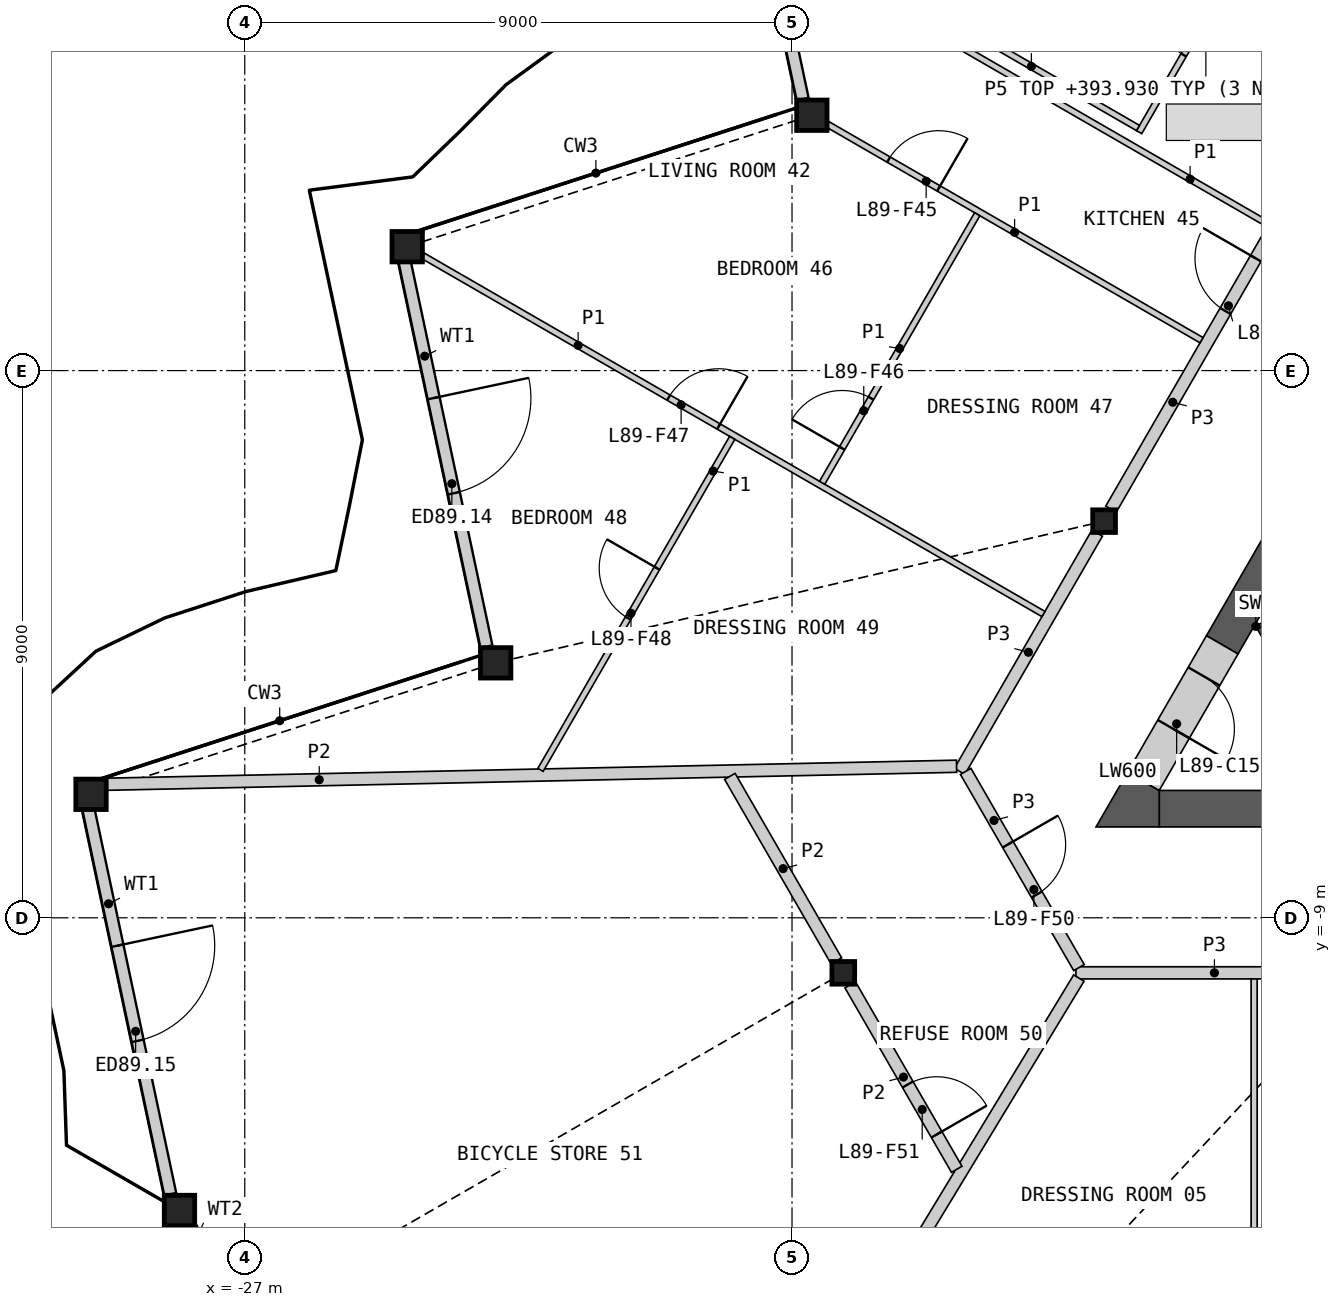
"""IFC4 building model, lengths in metres.
Left out: names, types, materials, properties, quantities, classifications, styles, units other than length and angle.
Written with IfcOpenShell. Run it as: python <this file> out.ifc"""

import sys

from ifc_helpers import new_model, si_unit, direction, frame, frame_2d, origin, origin_2d, place, context, subcontext, project, spatial, polyline, rectangle, hollow_rectangle, i_section, outline, extrude, element, fill, save


model = new_model("IFC4")
c1 = context("Model", 3, precision=1e-05, world=origin(), true_north=direction((0.0, 1.0)))
c2 = subcontext(c1, "Body", "Model", "MODEL_VIEW")
j1 = project(units=[si_unit("LENGTHUNIT", "METRE"), si_unit("PLANEANGLEUNIT", "RADIAN")], contexts=[c1])
p1 = place(None, origin())
s1 = spatial("IfcSite", under=j1, at=p1, CompositionType="ELEMENT")
p2 = place(p1, origin())
s2 = spatial("IfcBuilding", under=s1, at=p2, CompositionType="ELEMENT")
p3 = place(p2, frame((0.0, 0.0, 391.6)))
s3 = spatial("IfcBuildingStorey", under=s2, at=p3, CompositionType="ELEMENT", Elevation=391.6)
for number, where, z_axis, x_axis in (
    (1, (-17.674, 4.199, 0.0), (0.0, 0.0, 1.0), (1.0, 0.0, 0.0)),
    (2, (-24.329, 2.037, 0.0), (0.0, 0.0, 1.0), (1.0, 0.0, 0.0)),
    (3, (-22.874, -4.807, 0.0), (0.0, 0.0, 1.0), (1.0, 0.0, 0.0)),
    (4, (-29.529, -6.969, 0.0), (0.0, 0.0, 1.0), (1.0, 0.0, 0.0)),
    (5, (-28.074, -13.814, 0.0), (0.0, 0.0, 1.0), (1.0, 0.0, 0.0)),
):
    element("IfcColumn", number, at=place(p3, frame(where, z_axis=z_axis, x_axis=x_axis)), inside=s3, PredefinedType="COLUMN", context=c2, shape_type="SweptSolid", body=[
        extrude(hollow_rectangle(XDim=0.5, YDim=0.5, WallThickness=0.03, at=origin_2d()), origin(), (0.0, 0.0, 1.0), 3.4),
    ])
for number, where, z_axis, x_axis in (
    (6, (-12.868, -2.476, 0.0), (0.0, 0.0, 1.0), (1.0, 0.0, 0.0)),
    (7, (-17.157, -9.906, 0.0), (0.0, 0.0, 1.0), (1.0, 0.0, 0.0)),
):
    element("IfcColumn", number, at=place(p3, frame(where, z_axis=z_axis, x_axis=x_axis)), inside=s3, PredefinedType="COLUMN", context=c2, shape_type="SweptSolid", body=[
        extrude(i_section(OverallWidth=0.374, OverallDepth=0.372, WebThickness=0.016, FlangeThickness=0.026, at=origin_2d()), origin(), (0.0, 0.0, 1.0), 3.4),
    ])
p4 = place(p3, frame((-19.179, 10.836, 0.0), z_axis=(0.0, 0.0, 1.0), x_axis=(0.207910765171, -0.978147797486, 0.0)))
e8 = element("IfcWall", 8, at=p4, inside=s3, PredefinedType="SOLIDWALL", context=c2, shape_type="SweptSolid", body=[
    extrude(rectangle(XDim=6.512, YDim=0.2, at=frame_2d((3.256, 0.0))), origin(), (0.0, 0.0, 1.0), 2.634),
])
p5 = place(p4, frame((2.333, 0.0, 0.0)))
e9 = element("IfcOpeningElement", 9, at=p5, cuts=e8, PredefinedType="OPENING", context=c2, shape_type="SweptSolid", body=[
    extrude(rectangle(XDim=1.6, YDim=2.25, at=frame_2d((0.8, 1.125))), frame((0.0, 0.11, 0.0), z_axis=(0.0, -1.0, 0.0), x_axis=(1.0, 0.0, 0.0)), (0.0, 0.0, 1.0), 0.22),
])
p6 = place(p3, frame((-24.379, 1.83, 0.0), z_axis=(0.0, 0.0, 1.0), x_axis=(0.207910765171, -0.978147797486, 0.0)))
e10 = element("IfcWall", 10, at=p6, inside=s3, PredefinedType="SOLIDWALL", context=c2, shape_type="SweptSolid", body=[
    extrude(rectangle(XDim=6.512, YDim=0.2, at=frame_2d((3.256, 0.0))), origin(), (0.0, 0.0, 1.0), 2.634),
])
p7 = place(p6, frame((2.333, 0.0, 0.0)))
e11 = element("IfcOpeningElement", 11, at=p7, cuts=e10, PredefinedType="OPENING", context=c2, shape_type="SweptSolid", body=[
    extrude(rectangle(XDim=1.6, YDim=2.25, at=frame_2d((0.8, 1.125))), frame((0.0, 0.11, 0.0), z_axis=(0.0, -1.0, 0.0), x_axis=(1.0, 0.0, 0.0)), (0.0, 0.0, 1.0), 0.22),
])
p8 = place(p3, frame((-29.579, -7.177, 0.0), z_axis=(0.0, 0.0, 1.0), x_axis=(0.207910765171, -0.978147797486, 0.0)))
e12 = element("IfcWall", 12, at=p8, inside=s3, PredefinedType="SOLIDWALL", context=c2, shape_type="SweptSolid", body=[
    extrude(rectangle(XDim=6.512, YDim=0.2, at=frame_2d((3.256, 0.0))), origin(), (0.0, 0.0, 1.0), 2.634),
])
p9 = place(p8, frame((2.333, 0.0, 0.0)))
e13 = element("IfcOpeningElement", 13, at=p9, cuts=e12, PredefinedType="OPENING", context=c2, shape_type="SweptSolid", body=[
    extrude(rectangle(XDim=1.6, YDim=2.25, at=frame_2d((0.8, 1.125))), frame((0.0, 0.11, 0.0), z_axis=(0.0, -1.0, 0.0), x_axis=(1.0, 0.0, 0.0)), (0.0, 0.0, 1.0), 0.22),
])
p10 = place(p3, frame((-28.007, -13.939, 0.0), z_axis=(0.0, 0.0, 1.0), x_axis=(0.499967189098, -0.866044346339, 0.0)))
e14 = element("IfcWall", 14, at=p10, inside=s3, PredefinedType="SOLIDWALL", context=c2, shape_type="SweptSolid", body=[
    extrude(rectangle(XDim=1.612, YDim=0.25, at=frame_2d((0.806, 0.0))), origin(), (0.0, 0.0, 1.0), 2.634),
])
p11 = place(p10, frame((0.25, 0.0, 0.4)))
e15 = element("IfcOpeningElement", 15, at=p11, cuts=e14, PredefinedType="OPENING", context=c2, shape_type="SweptSolid", body=[
    extrude(rectangle(XDim=0.6, YDim=0.6, at=frame_2d((0.3, 0.3))), frame((0.0, 0.135, 0.0), z_axis=(0.0, -1.0, 0.0), x_axis=(1.0, 0.0, 0.0)), (0.0, 0.0, 1.0), 0.27),
])
p12 = place(p3, origin())
e16 = element("IfcWall", 16, at=p12, inside=s3, PredefinedType="SHEAR", context=c2, shape_type="SweptSolid", body=[
    extrude(outline(polyline([(-5.307, -1.281), (-10.374, -4.206), (-10.032, -4.298), (-5.182, -1.498), (-5.307, -1.281)])), origin(), (0.0, 0.0, 1.0), 3.1),
])
p13 = place(p3, origin())
e17 = element("IfcWall", 17, at=p13, inside=s3, PredefinedType="SHEAR", context=c2, shape_type="SweptSolid", body=[
    extrude(outline(polyline([(-10.374, -4.206), (-8.83, -6.881), (-8.738, -6.539), (-10.032, -4.298), (-10.374, -4.206)])), origin(), (0.0, 0.0, 1.0), 3.1),
])
p14 = place(p3, frame((-11.961, -7.206, 0.0), z_axis=(0.0, 0.0, 1.0), x_axis=(1.0, 0.0, 0.0)))
e18 = element("IfcWall", 18, at=p14, inside=s3, PredefinedType="SHEAR", context=c2, shape_type="SweptSolid", body=[
    extrude(rectangle(XDim=23.921, YDim=0.6, at=frame_2d((11.961, 0.0))), origin(), (0.0, 0.0, 1.0), 3.1),
])
p15 = place(p3, frame((-8.44, -0.208, 0.0), z_axis=(0.0, 0.0, 1.0), x_axis=(-0.500007425856, -0.866021116422, 0.0)))
e19 = element("IfcWall", 19, at=p15, inside=s3, PredefinedType="SHEAR", context=c2, shape_type="SweptSolid", body=[
    extrude(rectangle(XDim=4.969, YDim=0.6, at=frame_2d((2.484, 0.0))), origin(), (0.0, 0.0, 1.0), 3.1),
])
p16 = place(p3, origin())
e20 = element("IfcWall", 20, at=p16, inside=s3, PredefinedType="SHEAR", context=c2, shape_type="SweptSolid", body=[
    extrude(outline(polyline([(-12.48, -6.606), (-11.961, -6.906), (-11.961, -7.506), (-13.0, -7.506), (-12.48, -6.606)])), origin(), (0.0, 0.0, 1.0), 3.1),
])
p17 = place(p3, frame((-10.925, -4.511, 0.0), z_axis=(0.0, 0.0, 1.0), x_axis=(-0.500018667571, -0.866014625789, 0.0)))
e21 = element("IfcWall", 21, at=p17, inside=s3, PredefinedType="SHEAR", context=c2, shape_type="SweptSolid", body=[
    extrude(rectangle(XDim=2.592, YDim=0.6, at=frame_2d((1.296, 0.0))), origin(), (0.0, 0.0, 1.0), 3.1),
])
p18 = place(p17, frame((0.6, 0.0, 0.0)))
e22 = element("IfcOpeningElement", 22, at=p18, cuts=e21, PredefinedType="OPENING", context=c2, shape_type="SweptSolid", body=[
    extrude(rectangle(XDim=1.0, YDim=2.1, at=frame_2d((0.5, 1.05))), frame((0.0, 0.31, 0.0), z_axis=(0.0, -1.0, 0.0), x_axis=(1.0, 0.0, 0.0)), (0.0, 0.0, 1.0), 0.62),
])
p19 = place(p3, frame((-12.754, -2.279, 0.0), z_axis=(0.0, 0.0, 1.0), x_axis=(0.500001682468, 0.866024432409, 0.0)))
e23 = element("IfcWall", 23, at=p19, inside=s3, PredefinedType="PARTITIONING", context=c2, shape_type="SweptSolid", body=[
    extrude(rectangle(XDim=8.124, YDim=0.2, at=frame_2d((4.062, 0.0))), origin(), (0.0, 0.0, 1.0), 3.1),
])
p20 = place(p19, frame((3.762, 0.0, 0.0)))
e24 = element("IfcOpeningElement", 24, at=p20, cuts=e23, PredefinedType="OPENING", context=c2, shape_type="SweptSolid", body=[
    extrude(rectangle(XDim=1.0, YDim=2.1, at=frame_2d((0.5, 1.05))), frame((0.0, 0.11, 0.0), z_axis=(0.0, -1.0, 0.0), x_axis=(1.0, 0.0, 0.0)), (0.0, 0.0, 1.0), 0.22),
])
p21 = place(p3, frame((-13.331, -9.906, 0.0), z_axis=(0.0, 0.0, 1.0), x_axis=(1.0, 0.0, 0.0)))
e25 = element("IfcWall", 25, at=p21, inside=s3, PredefinedType="PARTITIONING", context=c2, shape_type="SweptSolid", body=[
    extrude(rectangle(XDim=4.555, YDim=0.2, at=frame_2d((2.278, 0.0))), origin(), (0.0, 0.0, 1.0), 3.1),
])
p22 = place(p3, frame((-15.244, -6.592, 0.0), z_axis=(0.0, 0.0, 1.0), x_axis=(0.499974648164, 0.866040040179, 0.0)))
e26 = element("IfcWall", 26, at=p22, inside=s3, PredefinedType="PARTITIONING", context=c2, shape_type="SweptSolid", body=[
    extrude(rectangle(XDim=4.525, YDim=0.2, at=frame_2d((2.263, 0.0))), origin(), (0.0, 0.0, 1.0), 3.1),
])
p23 = place(p3, frame((-15.144, -6.592, 0.0), z_axis=(0.0, 0.0, 1.0), x_axis=(0.499958791762, -0.866049194065, 0.0)))
e27 = element("IfcWall", 27, at=p23, inside=s3, PredefinedType="PARTITIONING", context=c2, shape_type="SweptSolid", body=[
    extrude(rectangle(XDim=3.726, YDim=0.2, at=frame_2d((1.863, 0.0))), origin(), (0.0, 0.0, 1.0), 3.1),
])
p24 = place(p23, frame((1.388, 0.0, 0.0)))
e28 = element("IfcOpeningElement", 28, at=p24, cuts=e27, PredefinedType="OPENING", context=c2, shape_type="SweptSolid", body=[
    extrude(rectangle(XDim=0.95, YDim=2.1, at=frame_2d((0.475, 1.05))), frame((0.0, 0.11, 0.0), z_axis=(0.0, -1.0, 0.0), x_axis=(1.0, 0.0, 0.0)), (0.0, 0.0, 1.0), 0.22),
])
p25 = place(p3, frame((-10.873, 6.278, 0.0), z_axis=(0.0, 0.0, 1.0), x_axis=(0.865989219354, -0.500062668036, 0.0)))
e29 = element("IfcWall", 29, at=p25, inside=s3, PredefinedType="PARTITIONING", context=c2, shape_type="SweptSolid", body=[
    extrude(rectangle(XDim=2.423, YDim=0.25, at=frame_2d((1.211, 0.0))), origin(), (0.0, 0.0, 1.0), 2.33),
])
p26 = place(p3, frame((-20.354, -21.66, 0.0), z_axis=(0.0, 0.0, 1.0), x_axis=(0.518240642668, 0.85523484277, 0.0)))
e30 = element("IfcWall", 30, at=p26, inside=s3, PredefinedType="PARTITIONING", context=c2, shape_type="SweptSolid", body=[
    extrude(rectangle(XDim=13.644, YDim=0.2, at=frame_2d((6.822, 0.0))), origin(), (0.0, 0.0, 1.0), 2.33),
])
p27 = place(p3, frame((-29.269, -6.804, 0.0), z_axis=(0.0, 0.0, 1.0), x_axis=(0.999775536303, 0.021186717777, 0.0)))
e31 = element("IfcWall", 31, at=p27, inside=s3, PredefinedType="PARTITIONING", context=c2, shape_type="SweptSolid", body=[
    extrude(rectangle(XDim=13.978, YDim=0.2, at=frame_2d((6.989, 0.0))), origin(), (0.0, 0.0, 1.0), 2.33),
])
p28 = place(p3, frame((-17.043, -10.103, 0.0), z_axis=(0.0, 0.0, 1.0), x_axis=(0.500005931509, -0.866021979199, 0.0)))
e32 = element("IfcWall", 32, at=p28, inside=s3, PredefinedType="PARTITIONING", context=c2, shape_type="SweptSolid", body=[
    extrude(rectangle(XDim=3.504, YDim=0.2, at=frame_2d((1.752, 0.0))), origin(), (0.0, 0.0, 1.0), 2.33),
])
p29 = place(p28, frame((1.893, 0.0, 0.0)))
e33 = element("IfcOpeningElement", 33, at=p29, cuts=e32, PredefinedType="OPENING", context=c2, shape_type="SweptSolid", body=[
    extrude(rectangle(XDim=0.95, YDim=2.1, at=frame_2d((0.475, 1.05))), frame((0.0, 0.11, 0.0), z_axis=(0.0, -1.0, 0.0), x_axis=(1.0, 0.0, 0.0)), (0.0, 0.0, 1.0), 0.22),
])
p30 = place(p3, frame((-19.022, -6.674, 0.0), z_axis=(0.0, 0.0, 1.0), x_axis=(0.499983843005, -0.866034731829, 0.0)))
e34 = element("IfcWall", 34, at=p30, inside=s3, PredefinedType="PARTITIONING", context=c2, shape_type="SweptSolid", body=[
    extrude(rectangle(XDim=3.503, YDim=0.2, at=frame_2d((1.752, 0.0))), origin(), (0.0, 0.0, 1.0), 2.33),
])
p31 = place(p3, frame((-10.4, -21.828, 0.0), z_axis=(0.0, 0.0, 1.0), x_axis=(0.0, 1.0, 0.0)))
e35 = element("IfcWall", 35, at=p31, inside=s3, PredefinedType="PARTITIONING", context=c2, shape_type="SweptSolid", body=[
    extrude(rectangle(XDim=11.822, YDim=0.1, at=frame_2d((5.911, 0.0))), origin(), (0.0, 0.0, 1.0), 2.33),
])
p32 = place(p31, frame((1.358, 0.0, 0.0)))
e36 = element("IfcOpeningElement", 36, at=p32, cuts=e35, PredefinedType="OPENING", context=c2, shape_type="SweptSolid", body=[
    extrude(rectangle(XDim=0.95, YDim=2.1, at=frame_2d((0.475, 1.05))), frame((0.0, 0.06, 0.0), z_axis=(0.0, -1.0, 0.0), x_axis=(1.0, 0.0, 0.0)), (0.0, 0.0, 1.0), 0.12),
])
p33 = place(p3, frame((-24.069, 1.887, 0.0), z_axis=(0.0, 0.0, 1.0), x_axis=(0.866023404247, -0.500003463284, 0.0)))
e37 = element("IfcWall", 37, at=p33, inside=s3, PredefinedType="PARTITIONING", context=c2, shape_type="SweptSolid", body=[
    extrude(rectangle(XDim=11.782, YDim=0.1, at=frame_2d((5.891, 0.0))), origin(), (0.0, 0.0, 1.0), 2.33),
])
p34 = place(p33, frame((4.664, 0.0, 0.0)))
e38 = element("IfcOpeningElement", 38, at=p34, cuts=e37, PredefinedType="OPENING", context=c2, shape_type="SweptSolid", body=[
    extrude(rectangle(XDim=0.95, YDim=2.1, at=frame_2d((0.475, 1.05))), frame((0.0, 0.06, 0.0), z_axis=(0.0, -1.0, 0.0), x_axis=(1.0, 0.0, 0.0)), (0.0, 0.0, 1.0), 0.12),
])
p35 = place(p3, frame((-17.414, 4.049, 0.0), z_axis=(0.0, 0.0, 1.0), x_axis=(0.866033839264, -0.499985389037, 0.0)))
e39 = element("IfcWall", 39, at=p35, inside=s3, PredefinedType="PARTITIONING", context=c2, shape_type="SweptSolid", body=[
    extrude(rectangle(XDim=7.1, YDim=0.1, at=frame_2d((3.55, 0.0))), origin(), (0.0, 0.0, 1.0), 2.33),
])
p36 = place(p35, frame((1.158, 0.0, 0.0)))
e40 = element("IfcOpeningElement", 40, at=p36, cuts=e39, PredefinedType="OPENING", context=c2, shape_type="SweptSolid", body=[
    extrude(rectangle(XDim=0.95, YDim=2.1, at=frame_2d((0.475, 1.05))), frame((0.0, 0.06, 0.0), z_axis=(0.0, -1.0, 0.0), x_axis=(1.0, 0.0, 0.0)), (0.0, 0.0, 1.0), 0.12),
])
p37 = place(p3, frame((-22.136, -6.567, 0.0), z_axis=(0.0, 0.0, 1.0), x_axis=(0.500016298831, 0.866015993445, 0.0)))
e41 = element("IfcWall", 41, at=p37, inside=s3, PredefinedType="PARTITIONING", context=c2, shape_type="SweptSolid", body=[
    extrude(rectangle(XDim=6.305, YDim=0.1, at=frame_2d((3.152, 0.0))), origin(), (0.0, 0.0, 1.0), 2.33),
])
p38 = place(p37, frame((2.88, 0.0, 0.0)))
e42 = element("IfcOpeningElement", 42, at=p38, cuts=e41, PredefinedType="OPENING", context=c2, shape_type="SweptSolid", body=[
    extrude(rectangle(XDim=0.95, YDim=2.1, at=frame_2d((0.475, 1.05))), frame((0.0, 0.06, 0.0), z_axis=(0.0, -1.0, 0.0), x_axis=(1.0, 0.0, 0.0)), (0.0, 0.0, 1.0), 0.12),
])
p39 = place(p3, frame((-15.318, 5.38, 0.0), z_axis=(0.0, 0.0, 1.0), x_axis=(0.866035260786, -0.499982926783, 0.0)))
e43 = element("IfcWall", 43, at=p39, inside=s3, PredefinedType="PARTITIONING", context=c2, shape_type="SweptSolid", body=[
    extrude(rectangle(XDim=5.95, YDim=0.1, at=frame_2d((2.975, 0.0))), origin(), (0.0, 0.0, 1.0), 2.33),
])
p40 = place(p3, frame((-12.292, 3.921, 0.0), z_axis=(0.0, 0.0, 1.0), x_axis=(0.499996545922, 0.866027397988, 0.0)))
e44 = element("IfcWall", 44, at=p40, inside=s3, PredefinedType="PARTITIONING", context=c2, shape_type="SweptSolid", body=[
    extrude(rectangle(XDim=5.5, YDim=0.1, at=frame_2d((2.75, 0.0))), origin(), (0.0, 0.0, 1.0), 2.33),
])
p41 = place(p40, frame((4.3, 0.0, 0.0)))
e45 = element("IfcOpeningElement", 45, at=p41, cuts=e44, PredefinedType="OPENING", context=c2, shape_type="SweptSolid", body=[
    extrude(rectangle(XDim=0.95, YDim=2.1, at=frame_2d((0.475, 1.05))), frame((0.0, 0.06, 0.0), z_axis=(0.0, -1.0, 0.0), x_axis=(1.0, 0.0, 0.0)), (0.0, 0.0, 1.0), 0.12),
])
p42 = place(p40, frame((1.465, 0.0, 0.0)))
e46 = element("IfcOpeningElement", 46, at=p42, cuts=e44, PredefinedType="OPENING", context=c2, shape_type="SweptSolid", body=[
    extrude(rectangle(XDim=0.95, YDim=2.1, at=frame_2d((0.475, 1.05))), frame((0.0, 0.06, 0.0), z_axis=(0.0, -1.0, 0.0), x_axis=(1.0, 0.0, 0.0)), (0.0, 0.0, 1.0), 0.12),
])
p43 = place(p3, frame((-17.504, -1.845, 0.0), z_axis=(0.0, 0.0, 1.0), x_axis=(0.499984882974, 0.866034131428, 0.0)))
e47 = element("IfcWall", 47, at=p43, inside=s3, PredefinedType="PARTITIONING", context=c2, shape_type="SweptSolid", body=[
    extrude(rectangle(XDim=5.1, YDim=0.1, at=frame_2d((2.55, 0.0))), origin(), (0.0, 0.0, 1.0), 2.33),
])
p44 = place(p43, frame((0.656, 0.0, 0.0)))
e48 = element("IfcOpeningElement", 48, at=p44, cuts=e47, PredefinedType="OPENING", context=c2, shape_type="SweptSolid", body=[
    extrude(rectangle(XDim=0.95, YDim=2.1, at=frame_2d((0.475, 1.05))), frame((0.0, 0.06, 0.0), z_axis=(0.0, -1.0, 0.0), x_axis=(1.0, 0.0, 0.0)), (0.0, 0.0, 1.0), 0.12),
])
p45 = place(p3, frame((-14.648, 5.34, 0.0), z_axis=(0.0, 0.0, 1.0), x_axis=(0.86599734893, -0.500048589285, 0.0)))
e49 = element("IfcWall", 49, at=p45, inside=s3, PredefinedType="PARTITIONING", context=c2, shape_type="SweptSolid", body=[
    extrude(rectangle(XDim=2.7, YDim=0.1, at=frame_2d((1.35, 0.0))), origin(), (0.0, 0.0, 1.0), 2.33),
])
p46 = place(p7, origin())
e50 = element("IfcDoor", 50, at=p46, inside=s3, OperationType="DOUBLE_DOOR_SINGLE_SWING", PredefinedType="DOOR", context=c2, shape_type="SweptSolid", body=[
    extrude(rectangle(XDim=1.6, YDim=2.25, at=frame_2d((0.8, 1.125))), frame((0.0, 0.025, 0.0), z_axis=(0.0, -1.0, 0.0), x_axis=(1.0, 0.0, 0.0)), (0.0, 0.0, 1.0), 0.05),
])
fill(e11, e50)
p47 = place(p9, origin())
e51 = element("IfcDoor", 51, at=p47, inside=s3, OperationType="DOUBLE_DOOR_SINGLE_SWING", PredefinedType="DOOR", context=c2, shape_type="SweptSolid", body=[
    extrude(rectangle(XDim=1.6, YDim=2.25, at=frame_2d((0.8, 1.125))), frame((0.0, 0.025, 0.0), z_axis=(0.0, -1.0, 0.0), x_axis=(1.0, 0.0, 0.0)), (0.0, 0.0, 1.0), 0.05),
])
fill(e13, e51)
p48 = place(p18, origin())
e52 = element("IfcDoor", 52, at=p48, inside=s3, OperationType="SINGLE_SWING_RIGHT", PredefinedType="DOOR", context=c2, shape_type="SweptSolid", body=[
    extrude(rectangle(XDim=1.0, YDim=2.1, at=frame_2d((0.5, 1.05))), frame((0.0, 0.055, 0.0), z_axis=(0.0, -1.0, 0.0), x_axis=(1.0, 0.0, 0.0)), (0.0, 0.0, 1.0), 0.05),
])
fill(e22, e52)
p49 = place(p20, origin())
e53 = element("IfcDoor", 53, at=p49, inside=s3, OperationType="SINGLE_SWING_RIGHT", PredefinedType="DOOR", context=c2, shape_type="SweptSolid", body=[
    extrude(rectangle(XDim=1.0, YDim=2.1, at=frame_2d((0.5, 1.05))), frame((0.0, 0.025, 0.0), z_axis=(0.0, -1.0, 0.0), x_axis=(1.0, 0.0, 0.0)), (0.0, 0.0, 1.0), 0.05),
])
fill(e24, e53)
p50 = place(p36, origin())
e54 = element("IfcDoor", 54, at=p50, inside=s3, OperationType="SINGLE_SWING_RIGHT", PredefinedType="DOOR", context=c2, shape_type="SweptSolid", body=[
    extrude(rectangle(XDim=0.95, YDim=2.1, at=frame_2d((0.475, 1.05))), frame((0.0, 0.025, 0.0), z_axis=(0.0, -1.0, 0.0), x_axis=(1.0, 0.0, 0.0)), (0.0, 0.0, 1.0), 0.05),
])
fill(e40, e54)
p51 = place(p44, origin())
e55 = element("IfcDoor", 55, at=p51, inside=s3, OperationType="SINGLE_SWING_LEFT", PredefinedType="DOOR", context=c2, shape_type="SweptSolid", body=[
    extrude(rectangle(XDim=0.95, YDim=2.1, at=frame_2d((0.475, 1.05))), frame((0.0, 0.025, 0.0), z_axis=(0.0, -1.0, 0.0), x_axis=(1.0, 0.0, 0.0)), (0.0, 0.0, 1.0), 0.05),
])
fill(e48, e55)
p52 = place(p34, origin())
e56 = element("IfcDoor", 56, at=p52, inside=s3, OperationType="SINGLE_SWING_RIGHT", PredefinedType="DOOR", context=c2, shape_type="SweptSolid", body=[
    extrude(rectangle(XDim=0.95, YDim=2.1, at=frame_2d((0.475, 1.05))), frame((0.0, 0.025, 0.0), z_axis=(0.0, -1.0, 0.0), x_axis=(1.0, 0.0, 0.0)), (0.0, 0.0, 1.0), 0.05),
])
fill(e38, e56)
p53 = place(p38, origin())
e57 = element("IfcDoor", 57, at=p53, inside=s3, OperationType="SINGLE_SWING_RIGHT", PredefinedType="DOOR", context=c2, shape_type="SweptSolid", body=[
    extrude(rectangle(XDim=0.95, YDim=2.1, at=frame_2d((0.475, 1.05))), frame((0.0, 0.025, 0.0), z_axis=(0.0, -1.0, 0.0), x_axis=(1.0, 0.0, 0.0)), (0.0, 0.0, 1.0), 0.05),
])
fill(e42, e57)
p54 = place(p42, origin())
e58 = element("IfcDoor", 58, at=p54, inside=s3, OperationType="SINGLE_SWING_RIGHT", PredefinedType="DOOR", context=c2, shape_type="SweptSolid", body=[
    extrude(rectangle(XDim=0.95, YDim=2.1, at=frame_2d((0.475, 1.05))), frame((0.0, 0.025, 0.0), z_axis=(0.0, -1.0, 0.0), x_axis=(1.0, 0.0, 0.0)), (0.0, 0.0, 1.0), 0.05),
])
fill(e46, e58)
p55 = place(p24, origin())
e59 = element("IfcDoor", 59, at=p55, inside=s3, OperationType="SINGLE_SWING_LEFT", PredefinedType="DOOR", context=c2, shape_type="SweptSolid", body=[
    extrude(rectangle(XDim=0.95, YDim=2.1, at=frame_2d((0.475, 1.05))), frame((0.0, 0.025, 0.0), z_axis=(0.0, -1.0, 0.0), x_axis=(1.0, 0.0, 0.0)), (0.0, 0.0, 1.0), 0.05),
])
fill(e28, e59)
p56 = place(p29, origin())
e60 = element("IfcDoor", 60, at=p56, inside=s3, OperationType="SINGLE_SWING_RIGHT", PredefinedType="DOOR", context=c2, shape_type="SweptSolid", body=[
    extrude(rectangle(XDim=0.95, YDim=2.1, at=frame_2d((0.475, 1.05))), frame((0.0, 0.025, 0.0), z_axis=(0.0, -1.0, 0.0), x_axis=(1.0, 0.0, 0.0)), (0.0, 0.0, 1.0), 0.05),
])
fill(e33, e60)
save(model, sys.argv[1])
